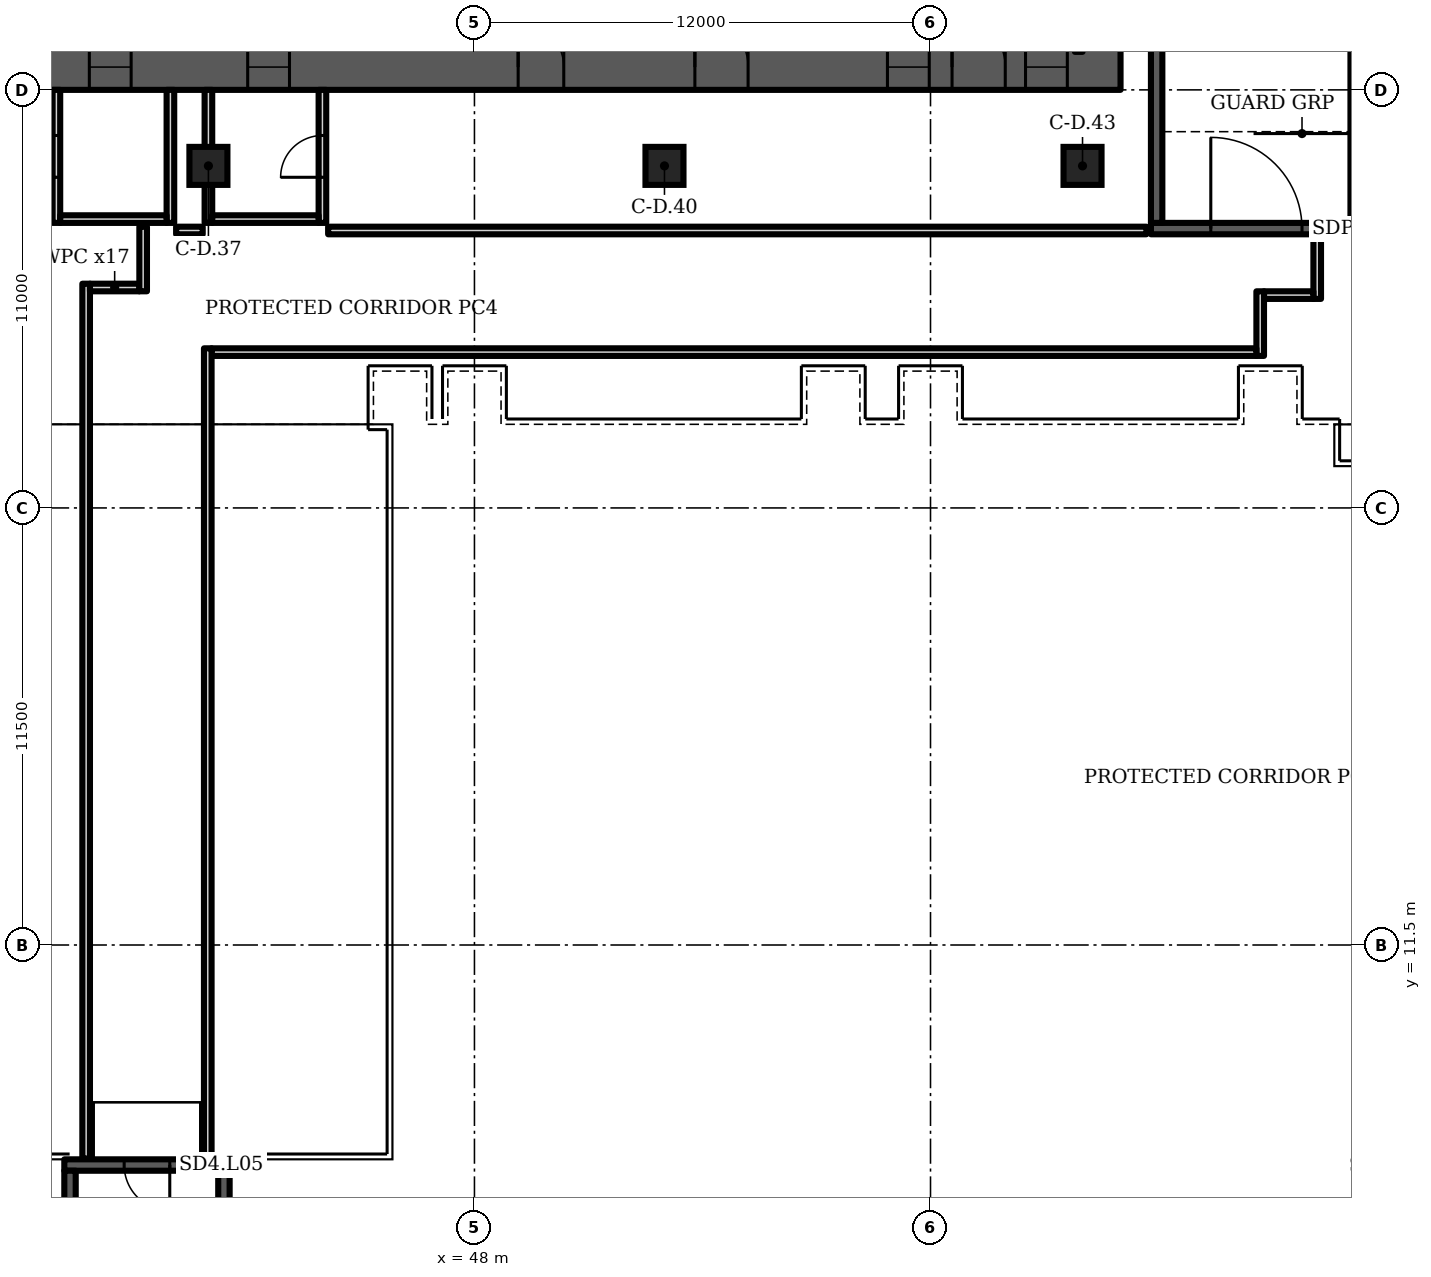
"""IFC4 building model, lengths in metres.
Left out: names, types, materials, properties, quantities, classifications, styles, units other than length and angle.
Written with IfcOpenShell. Run it as: python <this file> out.ifc"""

import sys

from ifc_helpers import new_model, si_unit, direction, frame, frame_2d, origin, origin_2d, place, context, subcontext, project, spatial, rectangle, extrude, element, fill, save


model = new_model("IFC4")
c1 = context("Model", 3, precision=1e-05, world=origin(), true_north=direction((0.0, 1.0)))
c2 = subcontext(c1, "Body", "Model", "MODEL_VIEW")
j1 = project(units=[si_unit("LENGTHUNIT", "METRE"), si_unit("PLANEANGLEUNIT", "RADIAN")], contexts=[c1])
p1 = place(None, origin())
s1 = spatial("IfcSite", under=j1, at=p1, CompositionType="ELEMENT")
p2 = place(p1, origin())
s2 = spatial("IfcBuilding", under=s1, at=p2, CompositionType="ELEMENT")
p3 = place(p2, frame((0.0, 0.0, 33.0)))
s3 = spatial("IfcBuildingStorey", under=s2, at=p3, CompositionType="ELEMENT", Elevation=33.0)
for number, where, z_axis, x_axis in (
    (1, (41.0, 32.0, 0.0), (0.0, 0.0, 1.0), (1.0, 0.0, 0.0)),
    (2, (53.0, 32.0, 0.0), (0.0, 0.0, 1.0), (1.0, 0.0, 0.0)),
    (3, (64.0, 32.0, 0.0), (0.0, 0.0, 1.0), (1.0, 0.0, 0.0)),
):
    element("IfcColumn", number, at=place(p3, frame(where, z_axis=z_axis, x_axis=x_axis)), inside=s3, PredefinedType="COLUMN", context=c2, shape_type="SweptSolid", body=[
        extrude(rectangle(XDim=1.0, YDim=1.0, at=origin_2d()), origin(), (0.0, 0.0, 1.0), 8.5),
    ])
p4 = place(p3, frame((9.0, 34.6, 0.0), z_axis=(0.0, 0.0, 1.0), x_axis=(1.0, 0.0, 0.0)))
e4 = element("IfcWall", 4, at=p4, inside=s3, PredefinedType="SHEAR", context=c2, shape_type="SweptSolid", body=[
    extrude(rectangle(XDim=56.0, YDim=1.2, at=frame_2d((28.0, 0.0))), origin(), (0.0, 0.0, 1.0), 8.1),
])
p5 = place(p4, frame((2.0, 0.0, 0.0)))
e5 = element("IfcOpeningElement", 5, at=p5, cuts=e4, PredefinedType="OPENING", context=c2, shape_type="SweptSolid", body=[
    extrude(rectangle(XDim=1.0, YDim=2.1, at=frame_2d((0.5, 1.05))), frame((0.0, 0.61, 0.0), z_axis=(0.0, -1.0, 0.0), x_axis=(1.0, 0.0, 0.0)), (0.0, 0.0, 1.0), 1.22),
])
p6 = place(p4, frame((4.6, 0.0, 0.0)))
e6 = element("IfcOpeningElement", 6, at=p6, cuts=e4, PredefinedType="OPENING", context=c2, shape_type="SweptSolid", body=[
    extrude(rectangle(XDim=1.0, YDim=2.1, at=frame_2d((0.5, 1.05))), frame((0.0, 0.61, 0.0), z_axis=(0.0, -1.0, 0.0), x_axis=(1.0, 0.0, 0.0)), (0.0, 0.0, 1.0), 1.22),
])
p7 = place(p4, frame((7.867, 0.0, 0.0)))
e7 = element("IfcOpeningElement", 7, at=p7, cuts=e4, PredefinedType="OPENING", context=c2, shape_type="SweptSolid", body=[
    extrude(rectangle(XDim=1.1, YDim=2.1, at=frame_2d((0.55, 1.05))), frame((0.0, 0.61, 0.0), z_axis=(0.0, -1.0, 0.0), x_axis=(1.0, 0.0, 0.0)), (0.0, 0.0, 1.0), 1.22),
])
p8 = place(p4, frame((12.033, 0.0, 0.0)))
e8 = element("IfcOpeningElement", 8, at=p8, cuts=e4, PredefinedType="OPENING", context=c2, shape_type="SweptSolid", body=[
    extrude(rectangle(XDim=1.1, YDim=2.1, at=frame_2d((0.55, 1.05))), frame((0.0, 0.61, 0.0), z_axis=(0.0, -1.0, 0.0), x_axis=(1.0, 0.0, 0.0)), (0.0, 0.0, 1.0), 1.22),
])
p9 = place(p4, frame((9.8, 0.0, 0.0)))
e9 = element("IfcOpeningElement", 9, at=p9, cuts=e4, PredefinedType="OPENING", context=c2, shape_type="SweptSolid", body=[
    extrude(rectangle(XDim=1.4, YDim=2.1, at=frame_2d((0.7, 1.05))), frame((0.0, 0.61, 0.0), z_axis=(0.0, -1.0, 0.0), x_axis=(1.0, 0.0, 0.0)), (0.0, 0.0, 1.0), 1.22),
])
p10 = place(p4, frame((14.65, 0.0, 0.0)))
e10 = element("IfcOpeningElement", 10, at=p10, cuts=e4, PredefinedType="OPENING", context=c2, shape_type="SweptSolid", body=[
    extrude(rectangle(XDim=1.2, YDim=2.1, at=frame_2d((0.6, 1.05))), frame((0.0, 0.61, 0.0), z_axis=(0.0, -1.0, 0.0), x_axis=(1.0, 0.0, 0.0)), (0.0, 0.0, 1.0), 1.22),
])
p11 = place(p4, frame((21.867, 0.0, 0.0)))
e11 = element("IfcOpeningElement", 11, at=p11, cuts=e4, PredefinedType="OPENING", context=c2, shape_type="SweptSolid", body=[
    extrude(rectangle(XDim=1.1, YDim=2.1, at=frame_2d((0.55, 1.05))), frame((0.0, 0.61, 0.0), z_axis=(0.0, -1.0, 0.0), x_axis=(1.0, 0.0, 0.0)), (0.0, 0.0, 1.0), 1.22),
])
p12 = place(p4, frame((26.033, 0.0, 0.0)))
e12 = element("IfcOpeningElement", 12, at=p12, cuts=e4, PredefinedType="OPENING", context=c2, shape_type="SweptSolid", body=[
    extrude(rectangle(XDim=1.1, YDim=2.1, at=frame_2d((0.55, 1.05))), frame((0.0, 0.61, 0.0), z_axis=(0.0, -1.0, 0.0), x_axis=(1.0, 0.0, 0.0)), (0.0, 0.0, 1.0), 1.22),
])
p13 = place(p4, frame((23.8, 0.0, 0.0)))
e13 = element("IfcOpeningElement", 13, at=p13, cuts=e4, PredefinedType="OPENING", context=c2, shape_type="SweptSolid", body=[
    extrude(rectangle(XDim=1.4, YDim=2.1, at=frame_2d((0.7, 1.05))), frame((0.0, 0.61, 0.0), z_axis=(0.0, -1.0, 0.0), x_axis=(1.0, 0.0, 0.0)), (0.0, 0.0, 1.0), 1.22),
])
p14 = place(p4, frame((28.867, 0.0, 0.0)))
e14 = element("IfcOpeningElement", 14, at=p14, cuts=e4, PredefinedType="OPENING", context=c2, shape_type="SweptSolid", body=[
    extrude(rectangle(XDim=1.1, YDim=2.1, at=frame_2d((0.55, 1.05))), frame((0.0, 0.61, 0.0), z_axis=(0.0, -1.0, 0.0), x_axis=(1.0, 0.0, 0.0)), (0.0, 0.0, 1.0), 1.22),
])
p15 = place(p4, frame((33.033, 0.0, 0.0)))
e15 = element("IfcOpeningElement", 15, at=p15, cuts=e4, PredefinedType="OPENING", context=c2, shape_type="SweptSolid", body=[
    extrude(rectangle(XDim=1.1, YDim=2.1, at=frame_2d((0.55, 1.05))), frame((0.0, 0.61, 0.0), z_axis=(0.0, -1.0, 0.0), x_axis=(1.0, 0.0, 0.0)), (0.0, 0.0, 1.0), 1.22),
])
p16 = place(p4, frame((40.15, 0.0, 0.0)))
e16 = element("IfcOpeningElement", 16, at=p16, cuts=e4, PredefinedType="OPENING", context=c2, shape_type="SweptSolid", body=[
    extrude(rectangle(XDim=1.2, YDim=2.1, at=frame_2d((0.6, 1.05))), frame((0.0, 0.61, 0.0), z_axis=(0.0, -1.0, 0.0), x_axis=(1.0, 0.0, 0.0)), (0.0, 0.0, 1.0), 1.22),
])
p17 = place(p4, frame((44.8, 0.0, 0.0)))
e17 = element("IfcOpeningElement", 17, at=p17, cuts=e4, PredefinedType="OPENING", context=c2, shape_type="SweptSolid", body=[
    extrude(rectangle(XDim=1.4, YDim=2.1, at=frame_2d((0.7, 1.05))), frame((0.0, 0.61, 0.0), z_axis=(0.0, -1.0, 0.0), x_axis=(1.0, 0.0, 0.0)), (0.0, 0.0, 1.0), 1.22),
])
p18 = place(p4, frame((49.867, 0.0, 0.0)))
e18 = element("IfcOpeningElement", 18, at=p18, cuts=e4, PredefinedType="OPENING", context=c2, shape_type="SweptSolid", body=[
    extrude(rectangle(XDim=1.1, YDim=2.1, at=frame_2d((0.55, 1.05))), frame((0.0, 0.61, 0.0), z_axis=(0.0, -1.0, 0.0), x_axis=(1.0, 0.0, 0.0)), (0.0, 0.0, 1.0), 1.22),
])
p19 = place(p4, frame((53.5, 0.0, 0.0)))
e19 = element("IfcOpeningElement", 19, at=p19, cuts=e4, PredefinedType="OPENING", context=c2, shape_type="SweptSolid", body=[
    extrude(rectangle(XDim=1.1, YDim=2.1, at=frame_2d((0.55, 1.05))), frame((0.0, 0.61, 0.0), z_axis=(0.0, -1.0, 0.0), x_axis=(1.0, 0.0, 0.0)), (0.0, 0.0, 1.0), 1.22),
])
p20 = place(p4, frame((51.567, 0.0, 0.0)))
e20 = element("IfcOpeningElement", 20, at=p20, cuts=e4, PredefinedType="OPENING", context=c2, shape_type="SweptSolid", body=[
    extrude(rectangle(XDim=1.4, YDim=2.1, at=frame_2d((0.7, 1.05))), frame((0.0, 0.61, 0.0), z_axis=(0.0, -1.0, 0.0), x_axis=(1.0, 0.0, 0.0)), (0.0, 0.0, 1.0), 1.22),
])
p21 = place(p3, frame((37.0, 30.5, 0.0), z_axis=(0.0, 0.0, 1.0), x_axis=(0.0, 1.0, 0.0)))
e21 = element("IfcWall", 21, at=p21, inside=s3, PredefinedType="PARTITIONING", context=c2, shape_type="SweptSolid", body=[
    extrude(rectangle(XDim=3.5, YDim=0.2, at=frame_2d((1.75, 0.0))), origin(), (0.0, 0.0, 1.0), 8.1),
])
p22 = place(p21, frame((1.2, 0.0, 0.0)))
e22 = element("IfcOpeningElement", 22, at=p22, cuts=e21, PredefinedType="OPENING", context=c2, shape_type="SweptSolid", body=[
    extrude(rectangle(XDim=1.1, YDim=2.1, at=frame_2d((0.55, 1.05))), frame((0.0, 0.11, 0.0), z_axis=(0.0, -1.0, 0.0), x_axis=(1.0, 0.0, 0.0)), (0.0, 0.0, 1.0), 0.22),
])
p23 = place(p3, frame((40.0, 30.5, 0.0), z_axis=(0.0, 0.0, 1.0), x_axis=(0.0, 1.0, 0.0)))
e23 = element("IfcWall", 23, at=p23, inside=s3, PredefinedType="PARTITIONING", context=c2, shape_type="SweptSolid", body=[
    extrude(rectangle(XDim=3.5, YDim=0.2, at=frame_2d((1.75, 0.0))), origin(), (0.0, 0.0, 1.0), 8.1),
])
p24 = place(p3, frame((37.1, 30.6, 0.0), z_axis=(0.0, 0.0, 1.0), x_axis=(1.0, 0.0, 0.0)))
e24 = element("IfcWall", 24, at=p24, inside=s3, PredefinedType="PARTITIONING", context=c2, shape_type="SweptSolid", body=[
    extrude(rectangle(XDim=2.8, YDim=0.2, at=frame_2d((1.4, 0.0))), origin(), (0.0, 0.0, 1.0), 8.1),
])
p25 = place(p3, frame((41.0, 30.5, 0.0), z_axis=(0.0, 0.0, 1.0), x_axis=(0.0, 1.0, 0.0)))
e25 = element("IfcWall", 25, at=p25, inside=s3, PredefinedType="PARTITIONING", context=c2, shape_type="SweptSolid", body=[
    extrude(rectangle(XDim=3.5, YDim=0.2, at=frame_2d((1.75, 0.0))), origin(), (0.0, 0.0, 1.0), 8.1),
])
p26 = place(p3, frame((44.0, 30.5, 0.0), z_axis=(0.0, 0.0, 1.0), x_axis=(0.0, 1.0, 0.0)))
e26 = element("IfcWall", 26, at=p26, inside=s3, PredefinedType="PARTITIONING", context=c2, shape_type="SweptSolid", body=[
    extrude(rectangle(XDim=3.5, YDim=0.2, at=frame_2d((1.75, 0.0))), origin(), (0.0, 0.0, 1.0), 8.1),
])
p27 = place(p26, frame((1.2, 0.0, 0.0)))
e27 = element("IfcOpeningElement", 27, at=p27, cuts=e26, PredefinedType="OPENING", context=c2, shape_type="SweptSolid", body=[
    extrude(rectangle(XDim=1.1, YDim=2.1, at=frame_2d((0.55, 1.05))), frame((0.0, 0.11, 0.0), z_axis=(0.0, -1.0, 0.0), x_axis=(1.0, 0.0, 0.0)), (0.0, 0.0, 1.0), 0.22),
])
p28 = place(p3, frame((41.1, 30.6, 0.0), z_axis=(0.0, 0.0, 1.0), x_axis=(1.0, 0.0, 0.0)))
e28 = element("IfcWall", 28, at=p28, inside=s3, PredefinedType="PARTITIONING", context=c2, shape_type="SweptSolid", body=[
    extrude(rectangle(XDim=2.8, YDim=0.2, at=frame_2d((1.4, 0.0))), origin(), (0.0, 0.0, 1.0), 8.1),
])
p29 = place(p3, frame((37.208, 5.711, 0.0), z_axis=(0.0, 0.0, 1.0), x_axis=(1.0, 0.0, 0.0)))
e29 = element("IfcWall", 29, at=p29, inside=s3, PredefinedType="SHEAR", context=c2, shape_type="SweptSolid", body=[
    extrude(rectangle(XDim=4.35, YDim=0.3, at=frame_2d((2.175, 0.0))), origin(), (0.0, 0.0, 1.0), 8.1),
])
p30 = place(p29, frame((1.575, 0.0, 0.0)))
e30 = element("IfcOpeningElement", 30, at=p30, cuts=e29, PredefinedType="OPENING", context=c2, shape_type="SweptSolid", body=[
    extrude(rectangle(XDim=1.2, YDim=2.1, at=frame_2d((0.6, 1.05))), frame((0.0, 0.16, 0.0), z_axis=(0.0, -1.0, 0.0), x_axis=(1.0, 0.0, 0.0)), (0.0, 0.0, 1.0), 0.32),
])
p31 = place(p3, frame((65.8, 30.35, 0.0), z_axis=(0.0, 0.0, 1.0), x_axis=(1.0, 0.0, 0.0)))
e31 = element("IfcWall", 31, at=p31, inside=s3, PredefinedType="SHEAR", context=c2, shape_type="SweptSolid", body=[
    extrude(rectangle(XDim=5.55, YDim=0.3, at=frame_2d((2.775, 0.0))), origin(), (0.0, 0.0, 1.0), 8.1),
])
p32 = place(p31, frame((1.575, 0.0, 0.0)))
e32 = element("IfcOpeningElement", 32, at=p32, cuts=e31, PredefinedType="OPENING", context=c2, shape_type="SweptSolid", body=[
    extrude(rectangle(XDim=2.4, YDim=2.1, at=frame_2d((1.2, 1.05))), frame((0.0, 0.16, 0.0), z_axis=(0.0, -1.0, 0.0), x_axis=(1.0, 0.0, 0.0)), (0.0, 0.0, 1.0), 0.32),
])
for number, where, z_axis, x_axis in (
    (33, (65.95, 30.5, 0.0), (0.0, 0.0, 1.0), (0.0, 1.0, 0.0)),
    (34, (71.2, 30.5, 0.0), (0.0, 0.0, 1.0), (0.0, 1.0, 0.0)),
):
    element("IfcWall", number, at=place(p3, frame(where, z_axis=z_axis, x_axis=x_axis)), inside=s3, PredefinedType="SHEAR", context=c2, shape_type="SweptSolid", body=[
        extrude(rectangle(XDim=8.4, YDim=0.3, at=frame_2d((4.2, 0.0))), origin(), (0.0, 0.0, 1.0), 8.1),
    ])
p33 = place(p3, frame((37.783, 5.881, 0.0), z_axis=(0.0, 0.0, 1.0), x_axis=(0.0, 1.0, 0.0)))
e35 = element("IfcWall", 35, at=p33, inside=s3, PredefinedType="PARTITIONING", context=c2, shape_type="SweptSolid", body=[
    extrude(rectangle(XDim=23.019, YDim=0.2, at=frame_2d((11.509, 0.0))), origin(), (0.0, 0.0, 1.0), 8.1),
])
p34 = place(p3, frame((37.883, 28.8, 0.0), z_axis=(0.0, 0.0, 1.0), x_axis=(1.0, 0.0, 0.0)))
e36 = element("IfcWall", 36, at=p34, inside=s3, PredefinedType="PARTITIONING", context=c2, shape_type="SweptSolid", body=[
    extrude(rectangle(XDim=1.3, YDim=0.2, at=frame_2d((0.65, 0.0))), origin(), (0.0, 0.0, 1.0), 8.1),
])
p35 = place(p3, frame((39.283, 28.7, 0.0), z_axis=(0.0, 0.0, 1.0), x_axis=(0.0, 1.0, 0.0)))
e37 = element("IfcWall", 37, at=p35, inside=s3, PredefinedType="PARTITIONING", context=c2, shape_type="SweptSolid", body=[
    extrude(rectangle(XDim=1.7, YDim=0.2, at=frame_2d((0.85, 0.0))), origin(), (0.0, 0.0, 1.0), 8.1),
])
p36 = place(p3, frame((40.15, 30.3, 0.0), z_axis=(0.0, 0.0, 1.0), x_axis=(1.0, 0.0, 0.0)))
e38 = element("IfcWall", 38, at=p36, inside=s3, PredefinedType="PARTITIONING", context=c2, shape_type="SweptSolid", body=[
    extrude(rectangle(XDim=0.7, YDim=0.2, at=frame_2d((0.35, 0.0))), origin(), (0.0, 0.0, 1.0), 8.1),
])
p37 = place(p3, frame((70.175, 28.5, 0.0), z_axis=(0.0, 0.0, 1.0), x_axis=(0.0, 1.0, 0.0)))
e39 = element("IfcWall", 39, at=p37, inside=s3, PredefinedType="PARTITIONING", context=c2, shape_type="SweptSolid", body=[
    extrude(rectangle(XDim=1.68, YDim=0.2, at=frame_2d((0.84, 0.0))), origin(), (0.0, 0.0, 1.0), 8.1),
])
p38 = place(p3, frame((68.775, 28.6, 0.0), z_axis=(0.0, 0.0, 1.0), x_axis=(1.0, 0.0, 0.0)))
e40 = element("IfcWall", 40, at=p38, inside=s3, PredefinedType="PARTITIONING", context=c2, shape_type="SweptSolid", body=[
    extrude(rectangle(XDim=1.3, YDim=0.2, at=frame_2d((0.65, 0.0))), origin(), (0.0, 0.0, 1.0), 8.1),
])
p39 = place(p3, frame((68.675, 27.0, 0.0), z_axis=(0.0, 0.0, 1.0), x_axis=(0.0, 1.0, 0.0)))
e41 = element("IfcWall", 41, at=p39, inside=s3, PredefinedType="PARTITIONING", context=c2, shape_type="SweptSolid", body=[
    extrude(rectangle(XDim=1.7, YDim=0.2, at=frame_2d((0.85, 0.0))), origin(), (0.0, 0.0, 1.0), 8.1),
])
p40 = place(p3, frame((41.083, 27.1, 0.0), z_axis=(0.0, 0.0, 1.0), x_axis=(1.0, 0.0, 0.0)))
e42 = element("IfcWall", 42, at=p40, inside=s3, PredefinedType="PARTITIONING", context=c2, shape_type="SweptSolid", body=[
    extrude(rectangle(XDim=27.492, YDim=0.2, at=frame_2d((13.746, 0.0))), origin(), (0.0, 0.0, 1.0), 8.1),
])
p41 = place(p3, frame((40.983, 5.881, 0.0), z_axis=(0.0, 0.0, 1.0), x_axis=(0.0, 1.0, 0.0)))
e43 = element("IfcWall", 43, at=p41, inside=s3, PredefinedType="PARTITIONING", context=c2, shape_type="SweptSolid", body=[
    extrude(rectangle(XDim=21.319, YDim=0.2, at=frame_2d((10.659, 0.0))), origin(), (0.0, 0.0, 1.0), 8.1),
])
p42 = place(p3, frame((44.15, 30.3, 0.0), z_axis=(0.0, 0.0, 1.0), x_axis=(1.0, 0.0, 0.0)))
e44 = element("IfcWall", 44, at=p42, inside=s3, PredefinedType="PARTITIONING", context=c2, shape_type="SweptSolid", body=[
    extrude(rectangle(XDim=21.53, YDim=0.2, at=frame_2d((10.765, 0.0))), origin(), (0.0, 0.0, 1.0), 8.1),
])
for number, where, z_axis, x_axis in (
    (45, (37.358, -1.939, 0.0), (0.0, 0.0, 1.0), (0.0, 1.0, 0.0)),
    (46, (41.408, -1.939, 0.0), (0.0, 0.0, 1.0), (0.0, 1.0, 0.0)),
):
    element("IfcWall", number, at=place(p3, frame(where, z_axis=z_axis, x_axis=x_axis)), inside=s3, PredefinedType="SHEAR", context=c2, shape_type="SweptSolid", body=[
        extrude(rectangle(XDim=7.5, YDim=0.3, at=frame_2d((3.75, 0.0))), origin(), (0.0, 0.0, 1.0), 8.1),
    ])
p43 = place(p14, origin())
e47 = element("IfcDoor", 47, at=p43, inside=s3, OperationType="DOUBLE_DOOR_SLIDING", PredefinedType="DOOR", context=c2, shape_type="SweptSolid", body=[
    extrude(rectangle(XDim=1.1, YDim=2.1, at=frame_2d((0.55, 1.05))), frame((0.0, 0.025, 0.0), z_axis=(0.0, -1.0, 0.0), x_axis=(1.0, 0.0, 0.0)), (0.0, 0.0, 1.0), 0.05),
])
fill(e14, e47)
p44 = place(p15, origin())
e48 = element("IfcDoor", 48, at=p44, inside=s3, OperationType="DOUBLE_DOOR_SLIDING", PredefinedType="DOOR", context=c2, shape_type="SweptSolid", body=[
    extrude(rectangle(XDim=1.1, YDim=2.1, at=frame_2d((0.55, 1.05))), frame((0.0, 0.025, 0.0), z_axis=(0.0, -1.0, 0.0), x_axis=(1.0, 0.0, 0.0)), (0.0, 0.0, 1.0), 0.05),
])
fill(e15, e48)
p45 = place(p16, origin())
e49 = element("IfcDoor", 49, at=p45, inside=s3, OperationType="SINGLE_SWING_LEFT", PredefinedType="DOOR", context=c2, shape_type="SweptSolid", body=[
    extrude(rectangle(XDim=1.2, YDim=2.1, at=frame_2d((0.6, 1.05))), frame((0.0, 0.025, 0.0), z_axis=(0.0, -1.0, 0.0), x_axis=(1.0, 0.0, 0.0)), (0.0, 0.0, 1.0), 0.05),
])
fill(e16, e49)
p46 = place(p17, origin())
e50 = element("IfcDoor", 50, at=p46, inside=s3, OperationType="DOUBLE_DOOR_SINGLE_SWING", PredefinedType="DOOR", context=c2, shape_type="SweptSolid", body=[
    extrude(rectangle(XDim=1.4, YDim=2.1, at=frame_2d((0.7, 1.05))), frame((0.0, 0.025, 0.0), z_axis=(0.0, -1.0, 0.0), x_axis=(1.0, 0.0, 0.0)), (0.0, 0.0, 1.0), 0.05),
])
fill(e17, e50)
p47 = place(p18, origin())
e51 = element("IfcDoor", 51, at=p47, inside=s3, OperationType="DOUBLE_DOOR_SLIDING", PredefinedType="DOOR", context=c2, shape_type="SweptSolid", body=[
    extrude(rectangle(XDim=1.1, YDim=2.1, at=frame_2d((0.55, 1.05))), frame((0.0, 0.025, 0.0), z_axis=(0.0, -1.0, 0.0), x_axis=(1.0, 0.0, 0.0)), (0.0, 0.0, 1.0), 0.05),
])
fill(e18, e51)
p48 = place(p19, origin())
e52 = element("IfcDoor", 52, at=p48, inside=s3, OperationType="DOUBLE_DOOR_SLIDING", PredefinedType="DOOR", context=c2, shape_type="SweptSolid", body=[
    extrude(rectangle(XDim=1.1, YDim=2.1, at=frame_2d((0.55, 1.05))), frame((0.0, 0.025, 0.0), z_axis=(0.0, -1.0, 0.0), x_axis=(1.0, 0.0, 0.0)), (0.0, 0.0, 1.0), 0.05),
])
fill(e19, e52)
p49 = place(p20, origin())
e53 = element("IfcDoor", 53, at=p49, inside=s3, OperationType="DOUBLE_DOOR_SINGLE_SWING", PredefinedType="DOOR", context=c2, shape_type="SweptSolid", body=[
    extrude(rectangle(XDim=1.4, YDim=2.1, at=frame_2d((0.7, 1.05))), frame((0.0, 0.025, 0.0), z_axis=(0.0, -1.0, 0.0), x_axis=(1.0, 0.0, 0.0)), (0.0, 0.0, 1.0), 0.05),
])
fill(e20, e53)
p50 = place(p22, origin())
e54 = element("IfcDoor", 54, at=p50, inside=s3, OperationType="SINGLE_SWING_LEFT", PredefinedType="DOOR", context=c2, shape_type="SweptSolid", body=[
    extrude(rectangle(XDim=1.1, YDim=2.1, at=frame_2d((0.55, 1.05))), frame((0.0, 0.025, 0.0), z_axis=(0.0, -1.0, 0.0), x_axis=(1.0, 0.0, 0.0)), (0.0, 0.0, 1.0), 0.05),
])
fill(e22, e54)
p51 = place(p27, origin())
e55 = element("IfcDoor", 55, at=p51, inside=s3, OperationType="SINGLE_SWING_LEFT", PredefinedType="DOOR", context=c2, shape_type="SweptSolid", body=[
    extrude(rectangle(XDim=1.1, YDim=2.1, at=frame_2d((0.55, 1.05))), frame((0.0, 0.025, 0.0), z_axis=(0.0, -1.0, 0.0), x_axis=(1.0, 0.0, 0.0)), (0.0, 0.0, 1.0), 0.05),
])
fill(e27, e55)
p52 = place(p30, origin())
e56 = element("IfcDoor", 56, at=p52, inside=s3, OperationType="SINGLE_SWING_RIGHT", PredefinedType="DOOR", context=c2, shape_type="SweptSolid", body=[
    extrude(rectangle(XDim=1.2, YDim=2.1, at=frame_2d((0.6, 1.05))), frame((0.0, 0.025, 0.0), z_axis=(0.0, -1.0, 0.0), x_axis=(1.0, 0.0, 0.0)), (0.0, 0.0, 1.0), 0.05),
])
fill(e30, e56)
p53 = place(p32, origin())
e57 = element("IfcDoor", 57, at=p53, inside=s3, OperationType="DOUBLE_DOOR_SINGLE_SWING", PredefinedType="DOOR", context=c2, shape_type="SweptSolid", body=[
    extrude(rectangle(XDim=2.4, YDim=2.1, at=frame_2d((1.2, 1.05))), frame((0.0, 0.025, 0.0), z_axis=(0.0, -1.0, 0.0), x_axis=(1.0, 0.0, 0.0)), (0.0, 0.0, 1.0), 0.05),
])
fill(e32, e57)
save(model, sys.argv[1])
